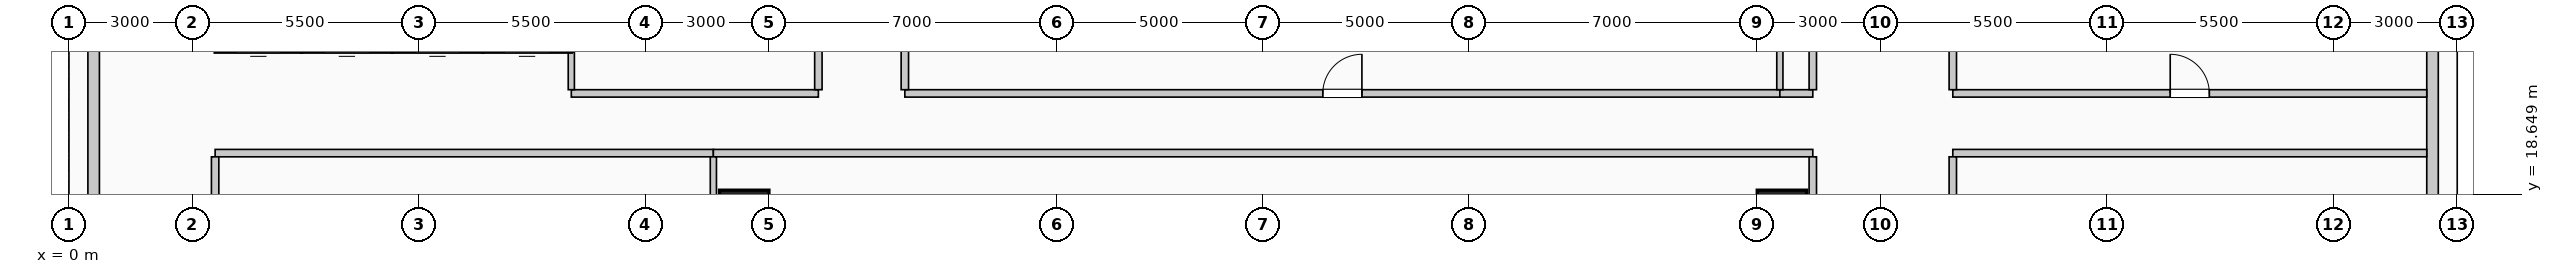
"""IFC4 building model, lengths in metres.
Left out: names, types, materials, properties, quantities, classifications, styles, units other than length and angle.
Written with IfcOpenShell. Run it as: python <this file> out.ifc"""

import sys

from ifc_helpers import new_model, si_unit, direction, frame, frame_2d, origin, origin_2d, place, context, subcontext, project, spatial, rectangle, extrude, element, fill, save


model = new_model("IFC4")
c1 = context("Model", 3, precision=1e-05, world=origin(), true_north=direction((0.0, 1.0)))
c2 = subcontext(c1, "Body", "Model", "MODEL_VIEW")
j1 = project(units=[si_unit("LENGTHUNIT", "METRE"), si_unit("PLANEANGLEUNIT", "RADIAN")], contexts=[c1])
p1 = place(None, origin())
s1 = spatial("IfcSite", under=j1, at=p1, CompositionType="ELEMENT")
p2 = place(p1, origin())
s2 = spatial("IfcBuilding", under=s1, at=p2, CompositionType="ELEMENT")
p3 = place(p2, frame((0.0, 0.0, 46.6)))
s3 = spatial("IfcBuildingStorey", under=s2, at=p3, CompositionType="ELEMENT", Elevation=46.6)
for number, where, z_axis, x_axis in (
    (1, (16.4, 18.0, 0.0), (0.0, 0.0, 1.0), (1.0, 0.0, 0.0)),
    (2, (41.6, 18.0, 0.0), (0.0, 0.0, 1.0), (1.0, 0.0, 0.0)),
):
    element("IfcColumn", number, at=place(p3, frame(where, z_axis=z_axis, x_axis=x_axis)), inside=s3, PredefinedType="COLUMN", context=c2, shape_type="SweptSolid", body=[
        extrude(rectangle(XDim=1.2, YDim=1.5, at=origin_2d()), origin(), (0.0, 0.0, 1.0), 4.0),
    ])
for number, where, z_axis, x_axis in (
    (3, (0.6, 18.47, 0.0), (0.0, 0.0, 1.0), (0.0, 1.0, 0.0)),
    (4, (57.4, 25.53, 0.0), (0.0, 0.0, 1.0), (0.0, -1.0, 0.0)),
):
    element("IfcWall", number, at=place(p3, frame(where, z_axis=z_axis, x_axis=x_axis)), inside=s3, PredefinedType="SOLIDWALL", context=c2, shape_type="SweptSolid", body=[
        extrude(rectangle(XDim=7.06, YDim=0.28, at=frame_2d((3.53, 0.0))), origin(), (0.0, 0.0, 1.0), 2.85),
    ])
p4 = place(p3, frame((5.65, 22.25, 0.0), z_axis=(0.0, 0.0, 1.0), x_axis=(-1.0, 0.0, 0.0)))
e5 = element("IfcWall", 5, at=p4, inside=s3, PredefinedType="SOLIDWALL", context=c2, shape_type="SweptSolid", body=[
    extrude(rectangle(XDim=2.1, YDim=0.3, at=frame_2d((1.05, 0.0))), origin(), (0.0, 0.0, 1.0), 4.0),
])
p5 = place(p4, frame((0.5, 0.0, 0.0)))
e6 = element("IfcOpeningElement", 6, at=p5, cuts=e5, PredefinedType="OPENING", context=c2, shape_type="SweptSolid", body=[
    extrude(rectangle(XDim=1.1, YDim=2.2, at=frame_2d((0.55, 1.1))), frame((0.0, 0.16, 0.0), z_axis=(0.0, -1.0, 0.0), x_axis=(1.0, 0.0, 0.0)), (0.0, 0.0, 1.0), 0.32),
])
p6 = place(p3, frame((7.85, 22.25, 0.0), z_axis=(0.0, 0.0, 1.0), x_axis=(-1.0, 0.0, 0.0)))
e7 = element("IfcWall", 7, at=p6, inside=s3, PredefinedType="SOLIDWALL", context=c2, shape_type="SweptSolid", body=[
    extrude(rectangle(XDim=2.2, YDim=0.3, at=frame_2d((1.1, 0.0))), origin(), (0.0, 0.0, 1.0), 4.0),
])
p7 = place(p6, frame((0.55, 0.0, 0.0)))
e8 = element("IfcOpeningElement", 8, at=p7, cuts=e7, PredefinedType="OPENING", context=c2, shape_type="SweptSolid", body=[
    extrude(rectangle(XDim=1.1, YDim=2.2, at=frame_2d((0.55, 1.1))), frame((0.0, 0.16, 0.0), z_axis=(0.0, -1.0, 0.0), x_axis=(1.0, 0.0, 0.0)), (0.0, 0.0, 1.0), 0.32),
])
p8 = place(p3, frame((10.05, 22.25, 0.0), z_axis=(0.0, 0.0, 1.0), x_axis=(-1.0, 0.0, 0.0)))
e9 = element("IfcWall", 9, at=p8, inside=s3, PredefinedType="SOLIDWALL", context=c2, shape_type="SweptSolid", body=[
    extrude(rectangle(XDim=2.2, YDim=0.3, at=frame_2d((1.1, 0.0))), origin(), (0.0, 0.0, 1.0), 4.0),
])
p9 = place(p8, frame((0.55, 0.0, 0.0)))
e10 = element("IfcOpeningElement", 10, at=p9, cuts=e9, PredefinedType="OPENING", context=c2, shape_type="SweptSolid", body=[
    extrude(rectangle(XDim=1.1, YDim=2.2, at=frame_2d((0.55, 1.1))), frame((0.0, 0.16, 0.0), z_axis=(0.0, -1.0, 0.0), x_axis=(1.0, 0.0, 0.0)), (0.0, 0.0, 1.0), 0.32),
])
p10 = place(p3, frame((12.2, 22.25, 0.0), z_axis=(0.0, 0.0, 1.0), x_axis=(-1.0, 0.0, 0.0)))
e11 = element("IfcWall", 11, at=p10, inside=s3, PredefinedType="SOLIDWALL", context=c2, shape_type="SweptSolid", body=[
    extrude(rectangle(XDim=2.15, YDim=0.3, at=frame_2d((1.075, 0.0))), origin(), (0.0, 0.0, 1.0), 4.0),
])
p11 = place(p10, frame((0.525, 0.0, 0.0)))
e12 = element("IfcOpeningElement", 12, at=p11, cuts=e11, PredefinedType="OPENING", context=c2, shape_type="SweptSolid", body=[
    extrude(rectangle(XDim=1.1, YDim=2.2, at=frame_2d((0.55, 1.1))), frame((0.0, 0.16, 0.0), z_axis=(0.0, -1.0, 0.0), x_axis=(1.0, 0.0, 0.0)), (0.0, 0.0, 1.0), 0.32),
])
p12 = place(p3, frame((3.55, 19.65, 0.0), z_axis=(0.0, 0.0, 1.0), x_axis=(1.0, 0.0, 0.0)))
e13 = element("IfcWall", 13, at=p12, inside=s3, PredefinedType="PARTITIONING", context=c2, shape_type="SweptSolid", body=[
    extrude(rectangle(XDim=12.1, YDim=0.18, at=frame_2d((6.05, 0.0))), origin(), (0.0, 0.0, 1.0), 3.7),
])
p13 = place(p3, frame((15.65, 19.65, 0.0), z_axis=(0.0, 0.0, 1.0), x_axis=(1.0, 0.0, 0.0)))
e14 = element("IfcWall", 14, at=p13, inside=s3, PredefinedType="PARTITIONING", context=c2, shape_type="SweptSolid", body=[
    extrude(rectangle(XDim=26.7, YDim=0.18, at=frame_2d((13.35, 0.0))), origin(), (0.0, 0.0, 1.0), 3.7),
])
p14 = place(p3, frame((45.75, 19.65, 0.0), z_axis=(0.0, 0.0, 1.0), x_axis=(1.0, 0.0, 0.0)))
e15 = element("IfcWall", 15, at=p14, inside=s3, PredefinedType="PARTITIONING", context=c2, shape_type="SweptSolid", body=[
    extrude(rectangle(XDim=11.51, YDim=0.18, at=frame_2d((5.755, 0.0))), origin(), (0.0, 0.0, 1.0), 3.7),
])
p15 = place(p3, frame((12.2, 21.1, 0.0), z_axis=(0.0, 0.0, 1.0), x_axis=(1.0, 0.0, 0.0)))
e16 = element("IfcWall", 16, at=p15, inside=s3, PredefinedType="PARTITIONING", context=c2, shape_type="SweptSolid", body=[
    extrude(rectangle(XDim=6.0, YDim=0.18, at=frame_2d((3.0, 0.0))), origin(), (0.0, 0.0, 1.0), 3.7),
])
p16 = place(p3, frame((20.3, 21.1, 0.0), z_axis=(0.0, 0.0, 1.0), x_axis=(1.0, 0.0, 0.0)))
e17 = element("IfcWall", 17, at=p16, inside=s3, PredefinedType="PARTITIONING", context=c2, shape_type="SweptSolid", body=[
    extrude(rectangle(XDim=21.25, YDim=0.18, at=frame_2d((10.625, 0.0))), origin(), (0.0, 0.0, 1.0), 3.7),
])
p17 = place(p16, frame((10.15, 0.0, 0.0)))
e18 = element("IfcOpeningElement", 18, at=p17, cuts=e17, PredefinedType="OPENING", context=c2, shape_type="SweptSolid", body=[
    extrude(rectangle(XDim=0.95, YDim=2.15, at=frame_2d((0.475, 1.075))), frame((0.0, 0.1, 0.0), z_axis=(0.0, -1.0, 0.0), x_axis=(1.0, 0.0, 0.0)), (0.0, 0.0, 1.0), 0.2),
])
p18 = place(p3, frame((41.55, 21.1, 0.0), z_axis=(0.0, 0.0, 1.0), x_axis=(1.0, 0.0, 0.0)))
e19 = element("IfcWall", 19, at=p18, inside=s3, PredefinedType="PARTITIONING", context=c2, shape_type="SweptSolid", body=[
    extrude(rectangle(XDim=0.8, YDim=0.18, at=frame_2d((0.4, 0.0))), origin(), (0.0, 0.0, 1.0), 3.7),
])
p19 = place(p3, frame((45.75, 21.1, 0.0), z_axis=(0.0, 0.0, 1.0), x_axis=(1.0, 0.0, 0.0)))
e20 = element("IfcWall", 20, at=p19, inside=s3, PredefinedType="PARTITIONING", context=c2, shape_type="SweptSolid", body=[
    extrude(rectangle(XDim=11.51, YDim=0.18, at=frame_2d((5.755, 0.0))), origin(), (0.0, 0.0, 1.0), 3.7),
])
p20 = place(p19, frame((5.28, 0.0, 0.0)))
e21 = element("IfcOpeningElement", 21, at=p20, cuts=e20, PredefinedType="OPENING", context=c2, shape_type="SweptSolid", body=[
    extrude(rectangle(XDim=0.95, YDim=2.15, at=frame_2d((0.475, 1.075))), frame((0.0, 0.1, 0.0), z_axis=(0.0, -1.0, 0.0), x_axis=(1.0, 0.0, 0.0)), (0.0, 0.0, 1.0), 0.2),
])
p21 = place(p3, frame((3.55, 16.39, 0.0), z_axis=(0.0, 0.0, 1.0), x_axis=(0.0, 1.0, 0.0)))
e22 = element("IfcWall", 22, at=p21, inside=s3, PredefinedType="PARTITIONING", context=c2, shape_type="SweptSolid", body=[
    extrude(rectangle(XDim=3.17, YDim=0.18, at=frame_2d((1.585, 0.0))), origin(), (0.0, 0.0, 1.0), 3.7),
])
p22 = place(p3, frame((12.2, 21.19, 0.0), z_axis=(0.0, 0.0, 1.0), x_axis=(0.0, 1.0, 0.0)))
e23 = element("IfcWall", 23, at=p22, inside=s3, PredefinedType="PARTITIONING", context=c2, shape_type="SweptSolid", body=[
    extrude(rectangle(XDim=0.91, YDim=0.15, at=frame_2d((0.455, 0.0))), origin(), (0.0, 0.0, 1.0), 3.7),
])
p23 = place(p3, frame((15.65, 16.39, 0.0), z_axis=(0.0, 0.0, 1.0), x_axis=(0.0, 1.0, 0.0)))
e24 = element("IfcWall", 24, at=p23, inside=s3, PredefinedType="PARTITIONING", context=c2, shape_type="SweptSolid", body=[
    extrude(rectangle(XDim=3.17, YDim=0.15, at=frame_2d((1.585, 0.0))), origin(), (0.0, 0.0, 1.0), 3.7),
])
for number, where, z_axis, x_axis in (
    (25, (18.2, 21.19, 0.0), (0.0, 0.0, 1.0), (0.0, 1.0, 0.0)),
    (26, (20.3, 21.19, 0.0), (0.0, 0.0, 1.0), (0.0, 1.0, 0.0)),
):
    element("IfcWall", number, at=place(p3, frame(where, z_axis=z_axis, x_axis=x_axis)), inside=s3, PredefinedType="PARTITIONING", context=c2, shape_type="SweptSolid", body=[
        extrude(rectangle(XDim=10.52, YDim=0.18, at=frame_2d((5.26, 0.0))), origin(), (0.0, 0.0, 1.0), 3.7),
    ])
p24 = place(p3, frame((41.55, 21.19, 0.0), z_axis=(0.0, 0.0, 1.0), x_axis=(0.0, 1.0, 0.0)))
e27 = element("IfcWall", 27, at=p24, inside=s3, PredefinedType="PARTITIONING", context=c2, shape_type="SweptSolid", body=[
    extrude(rectangle(XDim=4.06, YDim=0.15, at=frame_2d((2.03, 0.0))), origin(), (0.0, 0.0, 1.0), 2.995),
])
p25 = place(p3, frame((42.35, 16.39, 0.0), z_axis=(0.0, 0.0, 1.0), x_axis=(0.0, 1.0, 0.0)))
e28 = element("IfcWall", 28, at=p25, inside=s3, PredefinedType="PARTITIONING", context=c2, shape_type="SweptSolid", body=[
    extrude(rectangle(XDim=3.17, YDim=0.18, at=frame_2d((1.585, 0.0))), origin(), (0.0, 0.0, 1.0), 3.7),
])
p26 = place(p3, frame((42.35, 21.19, 0.0), z_axis=(0.0, 0.0, 1.0), x_axis=(0.0, 1.0, 0.0)))
e29 = element("IfcWall", 29, at=p26, inside=s3, PredefinedType="PARTITIONING", context=c2, shape_type="SweptSolid", body=[
    extrude(rectangle(XDim=11.085, YDim=0.18, at=frame_2d((5.542, 0.0))), origin(), (0.0, 0.0, 1.0), 3.7),
])
p27 = place(p3, frame((45.75, 16.39, 0.0), z_axis=(0.0, 0.0, 1.0), x_axis=(0.0, 1.0, 0.0)))
e30 = element("IfcWall", 30, at=p27, inside=s3, PredefinedType="PARTITIONING", context=c2, shape_type="SweptSolid", body=[
    extrude(rectangle(XDim=3.17, YDim=0.18, at=frame_2d((1.585, 0.0))), origin(), (0.0, 0.0, 1.0), 3.7),
])
p28 = place(p3, frame((45.75, 21.19, 0.0), z_axis=(0.0, 0.0, 1.0), x_axis=(0.0, 1.0, 0.0)))
e31 = element("IfcWall", 31, at=p28, inside=s3, PredefinedType="PARTITIONING", context=c2, shape_type="SweptSolid", body=[
    extrude(rectangle(XDim=11.085, YDim=0.18, at=frame_2d((5.542, 0.0))), origin(), (0.0, 0.0, 1.0), 3.7),
])
p29 = place(p17, origin())
e32 = element("IfcDoor", 32, at=p29, inside=s3, OperationType="SINGLE_SWING_RIGHT", PredefinedType="DOOR", context=c2, shape_type="SweptSolid", body=[
    extrude(rectangle(XDim=0.95, YDim=2.15, at=frame_2d((0.475, 1.075))), frame((0.0, 0.025, 0.0), z_axis=(0.0, -1.0, 0.0), x_axis=(1.0, 0.0, 0.0)), (0.0, 0.0, 1.0), 0.05),
])
fill(e18, e32)
p30 = place(p20, origin())
e33 = element("IfcDoor", 33, at=p30, inside=s3, OperationType="SINGLE_SWING_LEFT", PredefinedType="DOOR", context=c2, shape_type="SweptSolid", body=[
    extrude(rectangle(XDim=0.95, YDim=2.15, at=frame_2d((0.475, 1.075))), frame((0.0, 0.025, 0.0), z_axis=(0.0, -1.0, 0.0), x_axis=(1.0, 0.0, 0.0)), (0.0, 0.0, 1.0), 0.05),
])
fill(e21, e33)
save(model, sys.argv[1])
